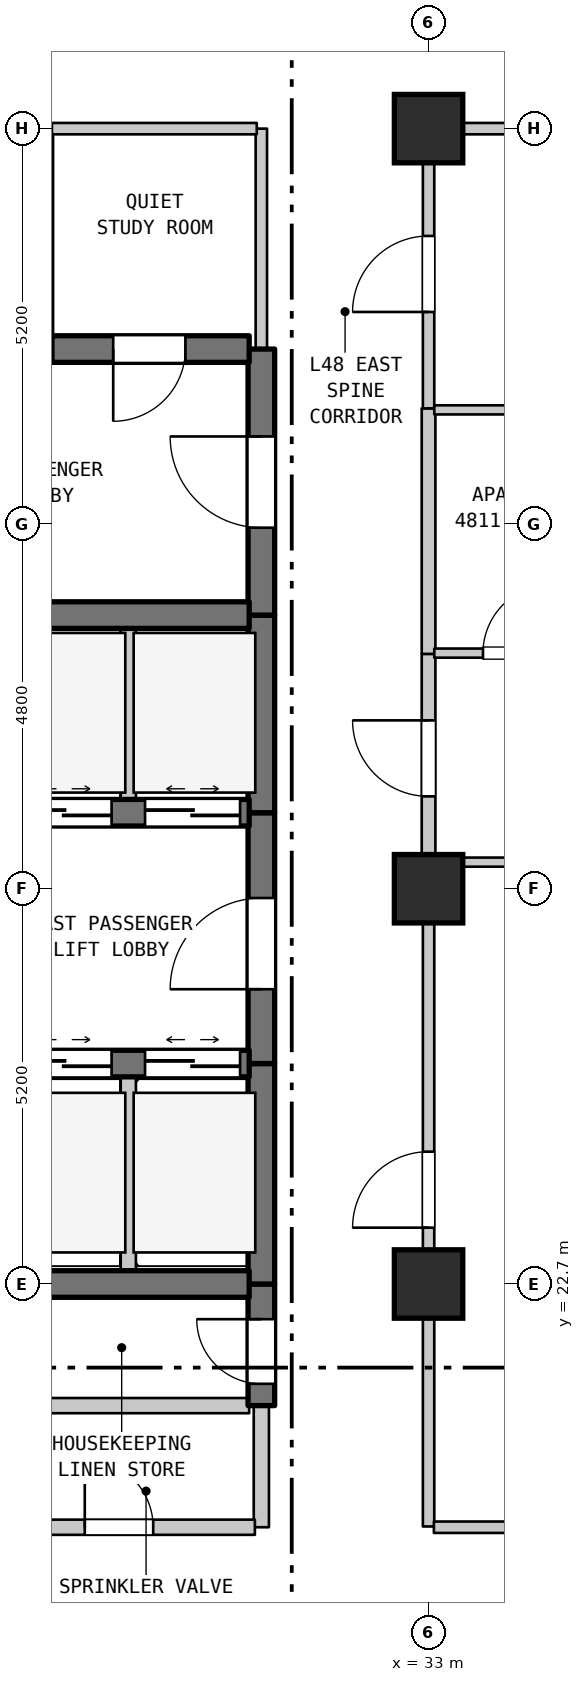
"""IFC4 building model, lengths in metres.
Left out: names, types, materials, properties, quantities, classifications, styles, units other than length and angle.
Written with IfcOpenShell. Run it as: python <this file> out.ifc"""

import sys

from ifc_helpers import new_model, si_unit, direction, frame, frame_2d, origin, origin_2d, place, context, subcontext, project, spatial, rectangle, extrude, element, fill, save


model = new_model("IFC4")
c1 = context("Model", 3, precision=1e-05, world=origin(), true_north=direction((0.0, 1.0)))
c2 = subcontext(c1, "Body", "Model", "MODEL_VIEW")
j1 = project(units=[si_unit("LENGTHUNIT", "METRE"), si_unit("PLANEANGLEUNIT", "RADIAN")], contexts=[c1])
p1 = place(None, origin())
s1 = spatial("IfcSite", under=j1, at=p1, CompositionType="ELEMENT")
p2 = place(p1, origin())
s2 = spatial("IfcBuilding", under=s1, at=p2, CompositionType="ELEMENT")
p3 = place(p2, frame((0.0, 0.0, 195.8)))
s3 = spatial("IfcBuildingStorey", under=s2, at=p3, CompositionType="ELEMENT", Elevation=195.8)
for number, where, z_axis, x_axis in (
    (1, (33.0, 22.7, 0.0), (0.0, 0.0, 1.0), (1.0, 0.0, 0.0)),
    (2, (33.0, 27.9, 0.0), (0.0, 0.0, 1.0), (1.0, 0.0, 0.0)),
    (3, (33.0, 37.9, 0.0), (0.0, 0.0, 1.0), (1.0, 0.0, 0.0)),
):
    element("IfcColumn", number, at=place(p3, frame(where, z_axis=z_axis, x_axis=x_axis)), inside=s3, PredefinedType="COLUMN", context=c2, shape_type="SweptSolid", body=[
        extrude(rectangle(XDim=0.9, YDim=0.9, at=origin_2d()), origin(), (0.0, 0.0, 1.0), 3.7),
    ])
p4 = place(p3, frame((28.0, 35.0, 0.0), z_axis=(0.0, 0.0, 1.0), x_axis=(0.0, 1.0, 0.0)))
e4 = element("IfcWall", 4, at=p4, inside=s3, PredefinedType="PARTITIONING", context=c2, shape_type="SweptSolid", body=[
    extrude(rectangle(XDim=2.9, YDim=0.12, at=frame_2d((1.45, 0.0))), origin(), (0.0, 0.0, 1.0), 3.39),
])
p5 = place(p3, frame((29.05, 22.7, 0.0), z_axis=(0.0, 0.0, 1.0), x_axis=(0.0, 1.0, 0.0)))
e5 = element("IfcWall", 5, at=p5, inside=s3, PredefinedType="STANDARD", context=c2, shape_type="SweptSolid", body=[
    extrude(rectangle(XDim=2.9, YDim=0.2, at=frame_2d((1.45, 0.0))), origin(), (0.0, 0.0, 1.0), 3.39),
])
p6 = place(p3, frame((29.05, 28.9, 0.0), z_axis=(0.0, 0.0, 1.0), x_axis=(0.0, 1.0, 0.0)))
e6 = element("IfcWall", 6, at=p6, inside=s3, PredefinedType="STANDARD", context=c2, shape_type="SweptSolid", body=[
    extrude(rectangle(XDim=2.6, YDim=0.2, at=frame_2d((1.3, 0.0))), origin(), (0.0, 0.0, 1.0), 3.39),
])
p7 = place(p3, frame((30.8, 19.5, 0.0), z_axis=(0.0, 0.0, 1.0), x_axis=(0.0, 1.0, 0.0)))
e7 = element("IfcWall", 7, at=p7, inside=s3, PredefinedType="STANDARD", context=c2, shape_type="SweptSolid", body=[
    extrude(rectangle(XDim=1.6, YDim=0.2, at=frame_2d((0.8, 0.0))), origin(), (0.0, 0.0, 1.0), 3.39),
])
p8 = place(p3, frame((30.8, 21.1, 0.0), z_axis=(0.0, 0.0, 1.0), x_axis=(0.0, 1.0, 0.0)))
e8 = element("IfcWall", 8, at=p8, inside=s3, PredefinedType="SHEAR", context=c2, shape_type="SweptSolid", body=[
    extrude(rectangle(XDim=1.6, YDim=0.35, at=frame_2d((0.8, 0.0))), origin(), (0.0, 0.0, 1.0), 3.39),
])
p9 = place(p8, frame((0.287, 0.0, 0.0)))
e9 = element("IfcOpeningElement", 9, at=p9, cuts=e8, PredefinedType="OPENING", context=c2, shape_type="SweptSolid", body=[
    extrude(rectangle(XDim=0.85, YDim=2.1, at=frame_2d((0.425, 1.05))), frame((0.0, 0.185, 0.0), z_axis=(0.0, -1.0, 0.0), x_axis=(1.0, 0.0, 0.0)), (0.0, 0.0, 1.0), 0.37),
])
p10 = place(p3, frame((30.8, 22.7, 0.0), z_axis=(0.0, 0.0, 1.0), x_axis=(0.0, 1.0, 0.0)))
e10 = element("IfcWall", 10, at=p10, inside=s3, PredefinedType="SHEAR", context=c2, shape_type="SweptSolid", body=[
    extrude(rectangle(XDim=2.9, YDim=0.35, at=frame_2d((1.45, 0.0))), origin(), (0.0, 0.0, 1.0), 3.39),
])
p11 = place(p3, frame((30.8, 25.6, 0.0), z_axis=(0.0, 0.0, 1.0), x_axis=(0.0, 1.0, 0.0)))
e11 = element("IfcWall", 11, at=p11, inside=s3, PredefinedType="SHEAR", context=c2, shape_type="SweptSolid", body=[
    extrude(rectangle(XDim=3.3, YDim=0.35, at=frame_2d((1.65, 0.0))), origin(), (0.0, 0.0, 1.0), 3.39),
])
p12 = place(p11, frame((0.978, 0.0, 0.0)))
e12 = element("IfcOpeningElement", 12, at=p12, cuts=e11, PredefinedType="OPENING", context=c2, shape_type="SweptSolid", body=[
    extrude(rectangle(XDim=1.2, YDim=2.2, at=frame_2d((0.6, 1.1))), frame((0.0, 0.185, 0.0), z_axis=(0.0, -1.0, 0.0), x_axis=(1.0, 0.0, 0.0)), (0.0, 0.0, 1.0), 0.37),
])
p13 = place(p3, frame((30.8, 28.9, 0.0), z_axis=(0.0, 0.0, 1.0), x_axis=(0.0, 1.0, 0.0)))
e13 = element("IfcWall", 13, at=p13, inside=s3, PredefinedType="SHEAR", context=c2, shape_type="SweptSolid", body=[
    extrude(rectangle(XDim=2.6, YDim=0.35, at=frame_2d((1.3, 0.0))), origin(), (0.0, 0.0, 1.0), 3.39),
])
p14 = place(p3, frame((30.8, 31.5, 0.0), z_axis=(0.0, 0.0, 1.0), x_axis=(0.0, 1.0, 0.0)))
e14 = element("IfcWall", 14, at=p14, inside=s3, PredefinedType="SHEAR", context=c2, shape_type="SweptSolid", body=[
    extrude(rectangle(XDim=3.5, YDim=0.35, at=frame_2d((1.75, 0.0))), origin(), (0.0, 0.0, 1.0), 3.39),
])
p15 = place(p14, frame((1.15, 0.0, 0.0)))
e15 = element("IfcOpeningElement", 15, at=p15, cuts=e14, PredefinedType="OPENING", context=c2, shape_type="SweptSolid", body=[
    extrude(rectangle(XDim=1.2, YDim=2.2, at=frame_2d((0.6, 1.1))), frame((0.0, 0.185, 0.0), z_axis=(0.0, -1.0, 0.0), x_axis=(1.0, 0.0, 0.0)), (0.0, 0.0, 1.0), 0.37),
])
p16 = place(p3, frame((30.8, 35.0, 0.0), z_axis=(0.0, 0.0, 1.0), x_axis=(0.0, 1.0, 0.0)))
e16 = element("IfcWall", 16, at=p16, inside=s3, PredefinedType="STANDARD", context=c2, shape_type="SweptSolid", body=[
    extrude(rectangle(XDim=2.9, YDim=0.15, at=frame_2d((1.45, 0.0))), origin(), (0.0, 0.0, 1.0), 3.39),
])
p17 = place(p3, frame((33.0, 19.51, 0.0), z_axis=(0.0, 0.0, 1.0), x_axis=(0.0, 1.0, 0.0)))
e17 = element("IfcWall", 17, at=p17, inside=s3, PredefinedType="STANDARD", context=c2, shape_type="SweptSolid", body=[
    extrude(rectangle(XDim=8.72, YDim=0.15, at=frame_2d((4.36, 0.0))), origin(), (0.0, 0.0, 1.0), 2.99),
])
p18 = place(p17, frame((3.931, 0.0, 0.0)))
e18 = element("IfcOpeningElement", 18, at=p18, cuts=e17, PredefinedType="OPENING", context=c2, shape_type="SweptSolid", body=[
    extrude(rectangle(XDim=1.0, YDim=2.15, at=frame_2d((0.5, 1.075))), frame((0.0, 0.085, 0.0), z_axis=(0.0, -1.0, 0.0), x_axis=(1.0, 0.0, 0.0)), (0.0, 0.0, 1.0), 0.17),
])
p19 = place(p3, frame((33.0, 28.24, 0.0), z_axis=(0.0, 0.0, 1.0), x_axis=(0.0, 1.0, 0.0)))
e19 = element("IfcWall", 19, at=p19, inside=s3, PredefinedType="STANDARD", context=c2, shape_type="SweptSolid", body=[
    extrude(rectangle(XDim=2.75, YDim=0.18, at=frame_2d((1.375, 0.0))), origin(), (0.0, 0.0, 1.0), 2.89),
])
p20 = place(p19, frame((0.875, 0.0, 0.0)))
e20 = element("IfcOpeningElement", 20, at=p20, cuts=e19, PredefinedType="OPENING", context=c2, shape_type="SweptSolid", body=[
    extrude(rectangle(XDim=1.0, YDim=2.15, at=frame_2d((0.5, 1.075))), frame((0.0, 0.1, 0.0), z_axis=(0.0, -1.0, 0.0), x_axis=(1.0, 0.0, 0.0)), (0.0, 0.0, 1.0), 0.2),
])
p21 = place(p3, frame((33.0, 30.99, 0.0), z_axis=(0.0, 0.0, 1.0), x_axis=(0.0, 1.0, 0.0)))
e21 = element("IfcWall", 21, at=p21, inside=s3, PredefinedType="STANDARD", context=c2, shape_type="SweptSolid", body=[
    extrude(rectangle(XDim=3.23, YDim=0.18, at=frame_2d((1.615, 0.0))), origin(), (0.0, 0.0, 1.0), 2.89),
])
p22 = place(p3, frame((33.0, 34.22, 0.0), z_axis=(0.0, 0.0, 1.0), x_axis=(0.0, 1.0, 0.0)))
e22 = element("IfcWall", 22, at=p22, inside=s3, PredefinedType="STANDARD", context=c2, shape_type="SweptSolid", body=[
    extrude(rectangle(XDim=3.68, YDim=0.15, at=frame_2d((1.84, 0.0))), origin(), (0.0, 0.0, 1.0), 2.89),
])
p23 = place(p22, frame((1.268, 0.0, 0.0)))
e23 = element("IfcOpeningElement", 23, at=p23, cuts=e22, PredefinedType="OPENING", context=c2, shape_type="SweptSolid", body=[
    extrude(rectangle(XDim=1.0, YDim=2.15, at=frame_2d((0.5, 1.075))), frame((0.0, 0.085, 0.0), z_axis=(0.0, -1.0, 0.0), x_axis=(1.0, 0.0, 0.0)), (0.0, 0.0, 1.0), 0.17),
])
p24 = place(p3, frame((27.285, 19.5, 0.0), z_axis=(0.0, 0.0, 1.0), x_axis=(1.0, 0.0, 0.0)))
e24 = element("IfcWall", 24, at=p24, inside=s3, PredefinedType="STANDARD", context=c2, shape_type="SweptSolid", body=[
    extrude(rectangle(XDim=3.43, YDim=0.2, at=frame_2d((1.715, 0.0))), origin(), (0.0, 0.0, 1.0), 3.39),
])
p25 = place(p24, frame((1.192, 0.0, 0.0)))
e25 = element("IfcOpeningElement", 25, at=p25, cuts=e24, PredefinedType="OPENING", context=c2, shape_type="SweptSolid", body=[
    extrude(rectangle(XDim=0.9, YDim=2.15, at=frame_2d((0.45, 1.075))), frame((0.0, 0.11, 0.0), z_axis=(0.0, -1.0, 0.0), x_axis=(1.0, 0.0, 0.0)), (0.0, 0.0, 1.0), 0.22),
])
p26 = place(p3, frame((33.07, 19.5, 0.0), z_axis=(0.0, 0.0, 1.0), x_axis=(1.0, 0.0, 0.0)))
e26 = element("IfcWall", 26, at=p26, inside=s3, PredefinedType="STANDARD", context=c2, shape_type="SweptSolid", body=[
    extrude(rectangle(XDim=21.51, YDim=0.15, at=frame_2d((10.755, 0.0))), origin(), (0.0, 0.0, 1.0), 3.39),
])
p27 = place(p26, frame((10.185, 0.0, 0.0)))
e27 = element("IfcOpeningElement", 27, at=p27, cuts=e26, PredefinedType="OPENING", context=c2, shape_type="SweptSolid", body=[
    extrude(rectangle(XDim=1.0, YDim=2.15, at=frame_2d((0.5, 1.075))), frame((0.0, 0.085, 0.0), z_axis=(0.0, -1.0, 0.0), x_axis=(1.0, 0.0, 0.0)), (0.0, 0.0, 1.0), 0.17),
])
p28 = place(p3, frame((27.285, 21.1, 0.0), z_axis=(0.0, 0.0, 1.0), x_axis=(1.0, 0.0, 0.0)))
e28 = element("IfcWall", 28, at=p28, inside=s3, PredefinedType="STANDARD", context=c2, shape_type="SweptSolid", body=[
    extrude(rectangle(XDim=3.355, YDim=0.2, at=frame_2d((1.677, 0.0))), origin(), (0.0, 0.0, 1.0), 3.39),
])
p29 = place(p3, frame((27.46, 22.7, 0.0), z_axis=(0.0, 0.0, 1.0), x_axis=(1.0, 0.0, 0.0)))
e29 = element("IfcWall", 29, at=p29, inside=s3, PredefinedType="SHEAR", context=c2, shape_type="SweptSolid", body=[
    extrude(rectangle(XDim=3.18, YDim=0.35, at=frame_2d((1.59, 0.0))), origin(), (0.0, 0.0, 1.0), 3.39),
])
p30 = place(p3, frame((27.46, 25.6, 0.0), z_axis=(0.0, 0.0, 1.0), x_axis=(1.0, 0.0, 0.0)))
e30 = element("IfcWall", 30, at=p30, inside=s3, PredefinedType="SHEAR", context=c2, shape_type="SweptSolid", body=[
    extrude(rectangle(XDim=3.18, YDim=0.35, at=frame_2d((1.59, 0.0))), origin(), (0.0, 0.0, 1.0), 3.39),
])
p31 = place(p30, frame((0.12, 0.0, 0.0)))
e31 = element("IfcOpeningElement", 31, at=p31, cuts=e30, PredefinedType="OPENING", context=c2, shape_type="SweptSolid", body=[
    extrude(rectangle(XDim=1.25, YDim=2.2, at=frame_2d((0.625, 1.1))), frame((0.0, 0.185, 0.0), z_axis=(0.0, -1.0, 0.0), x_axis=(1.0, 0.0, 0.0)), (0.0, 0.0, 1.0), 0.37),
])
p32 = place(p30, frame((1.81, 0.0, 0.0)))
e32 = element("IfcOpeningElement", 32, at=p32, cuts=e30, PredefinedType="OPENING", context=c2, shape_type="SweptSolid", body=[
    extrude(rectangle(XDim=1.25, YDim=2.2, at=frame_2d((0.625, 1.1))), frame((0.0, 0.185, 0.0), z_axis=(0.0, -1.0, 0.0), x_axis=(1.0, 0.0, 0.0)), (0.0, 0.0, 1.0), 0.37),
])
p33 = place(p3, frame((33.085, 28.25, 0.0), z_axis=(0.0, 0.0, 1.0), x_axis=(1.0, 0.0, 0.0)))
e33 = element("IfcWall", 33, at=p33, inside=s3, PredefinedType="PARTITIONING", context=c2, shape_type="SweptSolid", body=[
    extrude(rectangle(XDim=11.824, YDim=0.12, at=frame_2d((5.912, 0.0))), origin(), (0.0, 0.0, 1.0), 3.39),
])
p34 = place(p3, frame((27.46, 28.9, 0.0), z_axis=(0.0, 0.0, 1.0), x_axis=(1.0, 0.0, 0.0)))
e34 = element("IfcWall", 34, at=p34, inside=s3, PredefinedType="SHEAR", context=c2, shape_type="SweptSolid", body=[
    extrude(rectangle(XDim=3.18, YDim=0.35, at=frame_2d((1.59, 0.0))), origin(), (0.0, 0.0, 1.0), 3.39),
])
p35 = place(p34, frame((0.12, 0.0, 0.0)))
e35 = element("IfcOpeningElement", 35, at=p35, cuts=e34, PredefinedType="OPENING", context=c2, shape_type="SweptSolid", body=[
    extrude(rectangle(XDim=1.25, YDim=2.2, at=frame_2d((0.625, 1.1))), frame((0.0, 0.185, 0.0), z_axis=(0.0, -1.0, 0.0), x_axis=(1.0, 0.0, 0.0)), (0.0, 0.0, 1.0), 0.37),
])
p36 = place(p34, frame((1.81, 0.0, 0.0)))
e36 = element("IfcOpeningElement", 36, at=p36, cuts=e34, PredefinedType="OPENING", context=c2, shape_type="SweptSolid", body=[
    extrude(rectangle(XDim=1.25, YDim=2.2, at=frame_2d((0.625, 1.1))), frame((0.0, 0.185, 0.0), z_axis=(0.0, -1.0, 0.0), x_axis=(1.0, 0.0, 0.0)), (0.0, 0.0, 1.0), 0.37),
])
p37 = place(p3, frame((33.075, 31.0, 0.0), z_axis=(0.0, 0.0, 1.0), x_axis=(1.0, 0.0, 0.0)))
e37 = element("IfcWall", 37, at=p37, inside=s3, PredefinedType="PARTITIONING", context=c2, shape_type="SweptSolid", body=[
    extrude(rectangle(XDim=2.364, YDim=0.12, at=frame_2d((1.182, 0.0))), origin(), (0.0, 0.0, 1.0), 3.39),
])
p38 = place(p37, frame((0.641, 0.0, 0.0)))
e38 = element("IfcOpeningElement", 38, at=p38, cuts=e37, PredefinedType="OPENING", context=c2, shape_type="SweptSolid", body=[
    extrude(rectangle(XDim=0.9, YDim=2.15, at=frame_2d((0.45, 1.075))), frame((0.0, 0.07, 0.0), z_axis=(0.0, -1.0, 0.0), x_axis=(1.0, 0.0, 0.0)), (0.0, 0.0, 1.0), 0.14),
])
p39 = place(p3, frame((27.46, 31.5, 0.0), z_axis=(0.0, 0.0, 1.0), x_axis=(1.0, 0.0, 0.0)))
e39 = element("IfcWall", 39, at=p39, inside=s3, PredefinedType="SHEAR", context=c2, shape_type="SweptSolid", body=[
    extrude(rectangle(XDim=3.18, YDim=0.35, at=frame_2d((1.59, 0.0))), origin(), (0.0, 0.0, 1.0), 3.39),
])
p40 = place(p3, frame((33.075, 34.2, 0.0), z_axis=(0.0, 0.0, 1.0), x_axis=(1.0, 0.0, 0.0)))
e40 = element("IfcWall", 40, at=p40, inside=s3, PredefinedType="PARTITIONING", context=c2, shape_type="SweptSolid", body=[
    extrude(rectangle(XDim=2.364, YDim=0.12, at=frame_2d((1.182, 0.0))), origin(), (0.0, 0.0, 1.0), 3.39),
])
p41 = place(p3, frame((28.045, 35.0, 0.0), z_axis=(0.0, 0.0, 1.0), x_axis=(1.0, 0.0, 0.0)))
e41 = element("IfcWall", 41, at=p41, inside=s3, PredefinedType="SHEAR", context=c2, shape_type="SweptSolid", body=[
    extrude(rectangle(XDim=2.595, YDim=0.35, at=frame_2d((1.297, 0.0))), origin(), (0.0, 0.0, 1.0), 3.39),
])
p42 = place(p41, frame((0.806, 0.0, 0.0)))
e42 = element("IfcOpeningElement", 42, at=p42, cuts=e41, PredefinedType="OPENING", context=c2, shape_type="SweptSolid", body=[
    extrude(rectangle(XDim=0.95, YDim=2.15, at=frame_2d((0.475, 1.075))), frame((0.0, 0.185, 0.0), z_axis=(0.0, -1.0, 0.0), x_axis=(1.0, 0.0, 0.0)), (0.0, 0.0, 1.0), 0.37),
])
p43 = place(p3, frame((28.045, 37.9, 0.0), z_axis=(0.0, 0.0, 1.0), x_axis=(1.0, 0.0, 0.0)))
e43 = element("IfcWall", 43, at=p43, inside=s3, PredefinedType="STANDARD", context=c2, shape_type="SweptSolid", body=[
    extrude(rectangle(XDim=2.695, YDim=0.15, at=frame_2d((1.348, 0.0))), origin(), (0.0, 0.0, 1.0), 2.89),
])
p44 = place(p3, frame((33.06, 37.9, 0.0), z_axis=(0.0, 0.0, 1.0), x_axis=(1.0, 0.0, 0.0)))
e44 = element("IfcWall", 44, at=p44, inside=s3, PredefinedType="STANDARD", context=c2, shape_type="SweptSolid", body=[
    extrude(rectangle(XDim=7.164, YDim=0.15, at=frame_2d((3.582, 0.0))), origin(), (0.0, 0.0, 1.0), 3.39),
])
p45 = place(p44, frame((3.004, 0.0, 0.0)))
e45 = element("IfcOpeningElement", 45, at=p45, cuts=e44, PredefinedType="OPENING", context=c2, shape_type="SweptSolid", body=[
    extrude(rectangle(XDim=1.0, YDim=2.15, at=frame_2d((0.5, 1.075))), frame((0.0, 0.085, 0.0), z_axis=(0.0, -1.0, 0.0), x_axis=(1.0, 0.0, 0.0)), (0.0, 0.0, 1.0), 0.17),
])
p46 = place(p9, origin())
e46 = element("IfcDoor", 46, at=p46, inside=s3, OperationType="SINGLE_SWING_RIGHT", PredefinedType="DOOR", context=c2, shape_type="SweptSolid", body=[
    extrude(rectangle(XDim=0.85, YDim=2.1, at=frame_2d((0.425, 1.05))), frame((0.0, 0.025, 0.0), z_axis=(0.0, -1.0, 0.0), x_axis=(1.0, 0.0, 0.0)), (0.0, 0.0, 1.0), 0.05),
])
fill(e9, e46)
p47 = place(p12, origin())
e47 = element("IfcDoor", 47, at=p47, inside=s3, OperationType="SINGLE_SWING_LEFT", PredefinedType="DOOR", context=c2, shape_type="SweptSolid", body=[
    extrude(rectangle(XDim=1.2, YDim=2.2, at=frame_2d((0.6, 1.1))), frame((0.0, 0.025, 0.0), z_axis=(0.0, -1.0, 0.0), x_axis=(1.0, 0.0, 0.0)), (0.0, 0.0, 1.0), 0.05),
])
fill(e12, e47)
p48 = place(p15, origin())
e48 = element("IfcDoor", 48, at=p48, inside=s3, OperationType="SINGLE_SWING_RIGHT", PredefinedType="DOOR", context=c2, shape_type="SweptSolid", body=[
    extrude(rectangle(XDim=1.2, YDim=2.2, at=frame_2d((0.6, 1.1))), frame((0.0, 0.025, 0.0), z_axis=(0.0, -1.0, 0.0), x_axis=(1.0, 0.0, 0.0)), (0.0, 0.0, 1.0), 0.05),
])
fill(e15, e48)
p49 = place(p18, origin())
e49 = element("IfcDoor", 49, at=p49, inside=s3, OperationType="SINGLE_SWING_LEFT", PredefinedType="DOOR", context=c2, shape_type="SweptSolid", body=[
    extrude(rectangle(XDim=1.0, YDim=2.15, at=frame_2d((0.5, 1.075))), frame((0.0, 0.025, 0.0), z_axis=(0.0, -1.0, 0.0), x_axis=(1.0, 0.0, 0.0)), (0.0, 0.0, 1.0), 0.05),
])
fill(e18, e49)
p50 = place(p20, origin())
e50 = element("IfcDoor", 50, at=p50, inside=s3, OperationType="SINGLE_SWING_RIGHT", PredefinedType="DOOR", context=c2, shape_type="SweptSolid", body=[
    extrude(rectangle(XDim=1.0, YDim=2.15, at=frame_2d((0.5, 1.075))), frame((0.0, 0.025, 0.0), z_axis=(0.0, -1.0, 0.0), x_axis=(1.0, 0.0, 0.0)), (0.0, 0.0, 1.0), 0.05),
])
fill(e20, e50)
p51 = place(p23, origin())
e51 = element("IfcDoor", 51, at=p51, inside=s3, OperationType="SINGLE_SWING_LEFT", PredefinedType="DOOR", context=c2, shape_type="SweptSolid", body=[
    extrude(rectangle(XDim=1.0, YDim=2.15, at=frame_2d((0.5, 1.075))), frame((0.0, 0.025, 0.0), z_axis=(0.0, -1.0, 0.0), x_axis=(1.0, 0.0, 0.0)), (0.0, 0.0, 1.0), 0.05),
])
fill(e23, e51)
p52 = place(p25, origin())
e52 = element("IfcDoor", 52, at=p52, inside=s3, OperationType="SINGLE_SWING_LEFT", PredefinedType="DOOR", context=c2, shape_type="SweptSolid", body=[
    extrude(rectangle(XDim=0.9, YDim=2.15, at=frame_2d((0.45, 1.075))), frame((0.0, 0.025, 0.0), z_axis=(0.0, -1.0, 0.0), x_axis=(1.0, 0.0, 0.0)), (0.0, 0.0, 1.0), 0.05),
])
fill(e25, e52)
p53 = place(p31, origin())
e53 = element("IfcDoor", 53, at=p53, inside=s3, OperationType="DOUBLE_DOOR_SLIDING", PredefinedType="DOOR", context=c2, shape_type="SweptSolid", body=[
    extrude(rectangle(XDim=1.25, YDim=2.2, at=frame_2d((0.625, 1.1))), frame((0.0, 0.025, 0.0), z_axis=(0.0, -1.0, 0.0), x_axis=(1.0, 0.0, 0.0)), (0.0, 0.0, 1.0), 0.05),
])
fill(e31, e53)
p54 = place(p32, origin())
e54 = element("IfcDoor", 54, at=p54, inside=s3, OperationType="DOUBLE_DOOR_SLIDING", PredefinedType="DOOR", context=c2, shape_type="SweptSolid", body=[
    extrude(rectangle(XDim=1.25, YDim=2.2, at=frame_2d((0.625, 1.1))), frame((0.0, 0.025, 0.0), z_axis=(0.0, -1.0, 0.0), x_axis=(1.0, 0.0, 0.0)), (0.0, 0.0, 1.0), 0.05),
])
fill(e32, e54)
p55 = place(p35, origin())
e55 = element("IfcDoor", 55, at=p55, inside=s3, OperationType="DOUBLE_DOOR_SLIDING", PredefinedType="DOOR", context=c2, shape_type="SweptSolid", body=[
    extrude(rectangle(XDim=1.25, YDim=2.2, at=frame_2d((0.625, 1.1))), frame((0.0, 0.025, 0.0), z_axis=(0.0, -1.0, 0.0), x_axis=(1.0, 0.0, 0.0)), (0.0, 0.0, 1.0), 0.05),
])
fill(e35, e55)
p56 = place(p36, origin())
e56 = element("IfcDoor", 56, at=p56, inside=s3, OperationType="DOUBLE_DOOR_SLIDING", PredefinedType="DOOR", context=c2, shape_type="SweptSolid", body=[
    extrude(rectangle(XDim=1.25, YDim=2.2, at=frame_2d((0.625, 1.1))), frame((0.0, 0.025, 0.0), z_axis=(0.0, -1.0, 0.0), x_axis=(1.0, 0.0, 0.0)), (0.0, 0.0, 1.0), 0.05),
])
fill(e36, e56)
p57 = place(p38, origin())
e57 = element("IfcDoor", 57, at=p57, inside=s3, OperationType="SINGLE_SWING_RIGHT", PredefinedType="DOOR", context=c2, shape_type="SweptSolid", body=[
    extrude(rectangle(XDim=0.9, YDim=2.15, at=frame_2d((0.45, 1.075))), frame((0.0, 0.025, 0.0), z_axis=(0.0, -1.0, 0.0), x_axis=(1.0, 0.0, 0.0)), (0.0, 0.0, 1.0), 0.05),
])
fill(e38, e57)
p58 = place(p42, frame((0.95, 0.0, 0.0), z_axis=(0.0, 0.0, 1.0), x_axis=(-1.0, 0.0, 0.0)))
e58 = element("IfcDoor", 58, at=p58, inside=s3, OperationType="SINGLE_SWING_LEFT", PredefinedType="DOOR", context=c2, shape_type="SweptSolid", body=[
    extrude(rectangle(XDim=0.95, YDim=2.15, at=frame_2d((0.475, 1.075))), frame((0.0, 0.025, 0.0), z_axis=(0.0, -1.0, 0.0), x_axis=(1.0, 0.0, 0.0)), (0.0, 0.0, 1.0), 0.05),
])
fill(e42, e58)
save(model, sys.argv[1])
